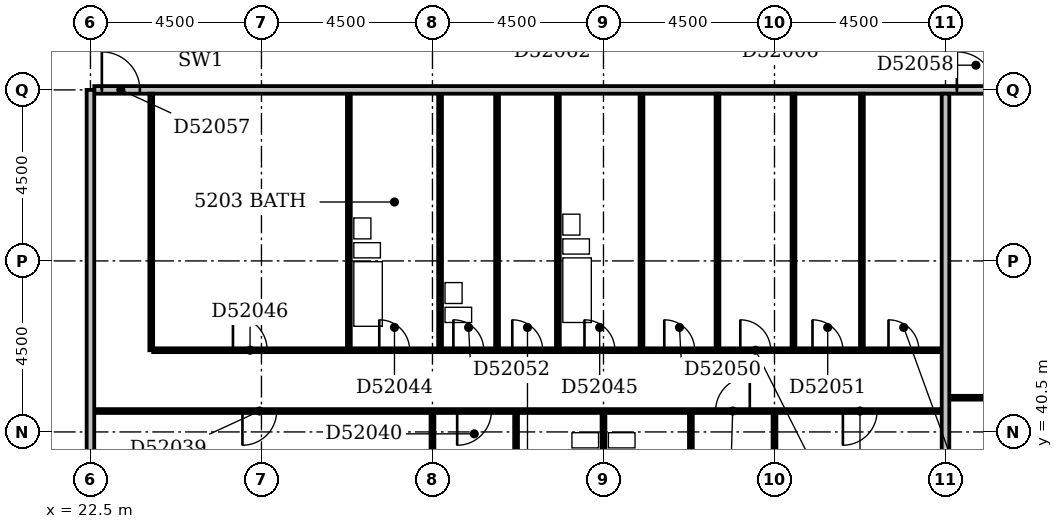
"""IFC4 building model, lengths in metres.
Left out: names, types, materials, properties, quantities, classifications, styles, units other than length and angle.
Written with IfcOpenShell. Run it as: python <this file> out.ifc"""

import sys

from ifc_helpers import new_model, si_unit, direction, frame, frame_2d, origin, place, context, subcontext, project, spatial, rectangle, extrude, element, fill, save


model = new_model("IFC4")
c1 = context("Model", 3, precision=1e-05, world=origin(), true_north=direction((0.0, 1.0)))
c2 = subcontext(c1, "Body", "Model", "MODEL_VIEW")
j1 = project(units=[si_unit("LENGTHUNIT", "METRE"), si_unit("PLANEANGLEUNIT", "RADIAN")], contexts=[c1])
p1 = place(None, origin())
s1 = spatial("IfcSite", under=j1, at=p1, CompositionType="ELEMENT")
p2 = place(p1, origin())
s2 = spatial("IfcBuilding", under=s1, at=p2, CompositionType="ELEMENT")
p3 = place(p2, frame((0.0, 0.0, 204.2)))
s3 = spatial("IfcBuildingStorey", under=s2, at=p3, CompositionType="ELEMENT", Elevation=204.2)
p4 = place(p3, frame((22.5, 36.45, 0.0), z_axis=(0.0, 0.0, 1.0), x_axis=(0.0, 1.0, 0.0)))
e1 = element("IfcWall", 1, at=p4, inside=s3, PredefinedType="PARTITIONING", context=c2, shape_type="SweptSolid", body=[
    extrude(rectangle(XDim=13.05, YDim=0.2, at=frame_2d((6.525, 0.0))), origin(), (0.0, 0.0, 1.0), 3.3),
])
p5 = place(p3, frame((31.5, 36.45, 0.0), z_axis=(0.0, 0.0, 1.0), x_axis=(0.0, 1.0, 0.0)))
e2 = element("IfcWall", 2, at=p5, inside=s3, PredefinedType="PARTITIONING", context=c2, shape_type="SweptSolid", body=[
    extrude(rectangle(XDim=4.55, YDim=0.1, at=frame_2d((2.275, 0.0))), origin(), (0.0, 0.0, 1.0), 3.3),
])
p6 = place(p3, frame((36.0, 36.45, 0.0), z_axis=(0.0, 0.0, 1.0), x_axis=(0.0, 1.0, 0.0)))
e3 = element("IfcWall", 3, at=p6, inside=s3, PredefinedType="PARTITIONING", context=c2, shape_type="SweptSolid", body=[
    extrude(rectangle(XDim=4.55, YDim=0.1, at=frame_2d((2.275, 0.0))), origin(), (0.0, 0.0, 1.0), 2.4),
])
p7 = place(p3, frame((40.5, 36.45, 0.0), z_axis=(0.0, 0.0, 1.0), x_axis=(0.0, 1.0, 0.0)))
e4 = element("IfcWall", 4, at=p7, inside=s3, PredefinedType="PARTITIONING", context=c2, shape_type="SweptSolid", body=[
    extrude(rectangle(XDim=4.55, YDim=0.1, at=frame_2d((2.275, 0.0))), origin(), (0.0, 0.0, 1.0), 3.3),
])
p8 = place(p3, frame((45.0, 36.45, 0.0), z_axis=(0.0, 0.0, 1.0), x_axis=(0.0, 1.0, 0.0)))
e5 = element("IfcWall", 5, at=p8, inside=s3, PredefinedType="PARTITIONING", context=c2, shape_type="SweptSolid", body=[
    extrude(rectangle(XDim=12.95, YDim=0.2, at=frame_2d((6.475, 0.0))), origin(), (0.0, 0.0, 1.0), 2.6),
])
p9 = place(p3, frame((33.7, 38.15, 0.0), z_axis=(0.0, 0.0, 1.0), x_axis=(0.0, 1.0, 0.0)))
e6 = element("IfcWall", 6, at=p9, inside=s3, PredefinedType="PLUMBINGWALL", context=c2, shape_type="SweptSolid", body=[
    extrude(rectangle(XDim=2.85, YDim=0.1, at=frame_2d((1.425, 0.0))), origin(), (0.0, 0.0, 1.0), 3.3),
])
p10 = place(p9, frame((1.05, 0.0, 0.0)))
e7 = element("IfcOpeningElement", 7, at=p10, cuts=e6, PredefinedType="OPENING", context=c2, shape_type="SweptSolid", body=[
    extrude(rectangle(XDim=0.8, YDim=2.1, at=frame_2d((0.4, 1.05))), frame((0.0, 0.062, 0.0), z_axis=(0.0, -1.0, 0.0), x_axis=(1.0, 0.0, 0.0)), (0.0, 0.0, 1.0), 0.124),
])
p11 = place(p3, frame((38.3, 38.15, 0.0), z_axis=(0.0, 0.0, 1.0), x_axis=(0.0, 1.0, 0.0)))
e8 = element("IfcWall", 8, at=p11, inside=s3, PredefinedType="PLUMBINGWALL", context=c2, shape_type="SweptSolid", body=[
    extrude(rectangle(XDim=2.85, YDim=0.1, at=frame_2d((1.425, 0.0))), origin(), (0.0, 0.0, 1.0), 3.3),
])
p12 = place(p11, frame((1.05, 0.0, 0.0)))
e9 = element("IfcOpeningElement", 9, at=p12, cuts=e8, PredefinedType="OPENING", context=c2, shape_type="SweptSolid", body=[
    extrude(rectangle(XDim=0.8, YDim=2.1, at=frame_2d((0.4, 1.05))), frame((0.0, 0.062, 0.0), z_axis=(0.0, -1.0, 0.0), x_axis=(1.0, 0.0, 0.0)), (0.0, 0.0, 1.0), 0.124),
])
p13 = place(p3, frame((22.6, 41.05, 0.0), z_axis=(0.0, 0.0, 1.0), x_axis=(1.0, 0.0, 0.0)))
e10 = element("IfcWall", 10, at=p13, inside=s3, PredefinedType="PARTITIONING", context=c2, shape_type="SweptSolid", body=[
    extrude(rectangle(XDim=22.3, YDim=0.1, at=frame_2d((11.15, 0.0))), origin(), (0.0, 0.0, 1.0), 3.3),
])
p14 = place(p13, frame((3.9, 0.0, 0.0)))
e11 = element("IfcOpeningElement", 11, at=p14, cuts=e10, PredefinedType="OPENING", context=c2, shape_type="SweptSolid", body=[
    extrude(rectangle(XDim=0.9, YDim=2.1, at=frame_2d((0.45, 1.05))), frame((0.0, 0.062, 0.0), z_axis=(0.0, -1.0, 0.0), x_axis=(1.0, 0.0, 0.0)), (0.0, 0.0, 1.0), 0.124),
])
p15 = place(p13, frame((9.55, 0.0, 0.0)))
e12 = element("IfcOpeningElement", 12, at=p15, cuts=e10, PredefinedType="OPENING", context=c2, shape_type="SweptSolid", body=[
    extrude(rectangle(XDim=0.9, YDim=2.1, at=frame_2d((0.45, 1.05))), frame((0.0, 0.062, 0.0), z_axis=(0.0, -1.0, 0.0), x_axis=(1.0, 0.0, 0.0)), (0.0, 0.0, 1.0), 0.124),
])
p16 = place(p13, frame((16.35, 0.0, 0.0)))
e13 = element("IfcOpeningElement", 13, at=p16, cuts=e10, PredefinedType="OPENING", context=c2, shape_type="SweptSolid", body=[
    extrude(rectangle(XDim=0.9, YDim=2.1, at=frame_2d((0.45, 1.05))), frame((0.0, 0.062, 0.0), z_axis=(0.0, -1.0, 0.0), x_axis=(1.0, 0.0, 0.0)), (0.0, 0.0, 1.0), 0.124),
])
p17 = place(p13, frame((19.7, 0.0, 0.0)))
e14 = element("IfcOpeningElement", 14, at=p17, cuts=e10, PredefinedType="OPENING", context=c2, shape_type="SweptSolid", body=[
    extrude(rectangle(XDim=0.9, YDim=2.1, at=frame_2d((0.45, 1.05))), frame((0.0, 0.062, 0.0), z_axis=(0.0, -1.0, 0.0), x_axis=(1.0, 0.0, 0.0)), (0.0, 0.0, 1.0), 0.124),
])
p18 = place(p3, frame((45.1, 41.4, 0.0), z_axis=(0.0, 0.0, 1.0), x_axis=(1.0, 0.0, 0.0)))
e15 = element("IfcWall", 15, at=p18, inside=s3, PredefinedType="PARTITIONING", context=c2, shape_type="SweptSolid", body=[
    extrude(rectangle(XDim=9.5, YDim=0.1, at=frame_2d((4.75, 0.0))), origin(), (0.0, 0.0, 1.0), 3.3),
])
p19 = place(p18, frame((3.95, 0.0, 0.0)))
e16 = element("IfcOpeningElement", 16, at=p19, cuts=e15, PredefinedType="OPENING", context=c2, shape_type="SweptSolid", body=[
    extrude(rectangle(XDim=0.9, YDim=2.1, at=frame_2d((0.45, 1.05))), frame((0.0, 0.062, 0.0), z_axis=(0.0, -1.0, 0.0), x_axis=(1.0, 0.0, 0.0)), (0.0, 0.0, 1.0), 0.124),
])
p20 = place(p3, frame((24.1, 42.65, 0.0), z_axis=(0.0, 0.0, 1.0), x_axis=(0.0, 1.0, 0.0)))
e17 = element("IfcWall", 17, at=p20, inside=s3, PredefinedType="PARTITIONING", context=c2, shape_type="SweptSolid", body=[
    extrude(rectangle(XDim=6.75, YDim=0.1, at=frame_2d((3.375, 0.0))), origin(), (0.0, 0.0, 1.0), 3.3),
])
p21 = place(p3, frame((24.15, 42.65, 0.0), z_axis=(0.0, 0.0, 1.0), x_axis=(1.0, 0.0, 0.0)))
e18 = element("IfcWall", 18, at=p21, inside=s3, PredefinedType="PARTITIONING", context=c2, shape_type="SweptSolid", body=[
    extrude(rectangle(XDim=20.75, YDim=0.1, at=frame_2d((10.375, 0.0))), origin(), (0.0, 0.0, 1.0), 3.3),
])
p22 = place(p21, frame((5.95, 0.0, 0.0)))
e19 = element("IfcOpeningElement", 19, at=p22, cuts=e18, PredefinedType="OPENING", context=c2, shape_type="SweptSolid", body=[
    extrude(rectangle(XDim=0.8, YDim=2.1, at=frame_2d((0.4, 1.05))), frame((0.0, 0.062, 0.0), z_axis=(0.0, -1.0, 0.0), x_axis=(1.0, 0.0, 0.0)), (0.0, 0.0, 1.0), 0.124),
])
p23 = place(p21, frame((11.35, 0.0, 0.0)))
e20 = element("IfcOpeningElement", 20, at=p23, cuts=e18, PredefinedType="OPENING", context=c2, shape_type="SweptSolid", body=[
    extrude(rectangle(XDim=0.8, YDim=2.1, at=frame_2d((0.4, 1.05))), frame((0.0, 0.062, 0.0), z_axis=(0.0, -1.0, 0.0), x_axis=(1.0, 0.0, 0.0)), (0.0, 0.0, 1.0), 0.124),
])
p24 = place(p21, frame((2.1, 0.0, 0.0)))
e21 = element("IfcOpeningElement", 21, at=p24, cuts=e18, PredefinedType="OPENING", context=c2, shape_type="SweptSolid", body=[
    extrude(rectangle(XDim=0.9, YDim=2.1, at=frame_2d((0.45, 1.05))), frame((0.0, 0.062, 0.0), z_axis=(0.0, -1.0, 0.0), x_axis=(1.0, 0.0, 0.0)), (0.0, 0.0, 1.0), 0.124),
])
p25 = place(p21, frame((19.35, 0.0, 0.0)))
e22 = element("IfcOpeningElement", 22, at=p25, cuts=e18, PredefinedType="OPENING", context=c2, shape_type="SweptSolid", body=[
    extrude(rectangle(XDim=0.8, YDim=2.1, at=frame_2d((0.4, 1.05))), frame((0.0, 0.062, 0.0), z_axis=(0.0, -1.0, 0.0), x_axis=(1.0, 0.0, 0.0)), (0.0, 0.0, 1.0), 0.124),
])
p26 = place(p21, frame((15.45, 0.0, 0.0)))
e23 = element("IfcOpeningElement", 23, at=p26, cuts=e18, PredefinedType="OPENING", context=c2, shape_type="SweptSolid", body=[
    extrude(rectangle(XDim=0.8, YDim=2.1, at=frame_2d((0.4, 1.05))), frame((0.0, 0.062, 0.0), z_axis=(0.0, -1.0, 0.0), x_axis=(1.0, 0.0, 0.0)), (0.0, 0.0, 1.0), 0.124),
])
p27 = place(p21, frame((9.45, 0.0, 0.0)))
e24 = element("IfcOpeningElement", 24, at=p27, cuts=e18, PredefinedType="OPENING", context=c2, shape_type="SweptSolid", body=[
    extrude(rectangle(XDim=0.8, YDim=2.1, at=frame_2d((0.4, 1.05))), frame((0.0, 0.062, 0.0), z_axis=(0.0, -1.0, 0.0), x_axis=(1.0, 0.0, 0.0)), (0.0, 0.0, 1.0), 0.124),
])
p28 = place(p21, frame((13.45, 0.0, 0.0)))
e25 = element("IfcOpeningElement", 25, at=p28, cuts=e18, PredefinedType="OPENING", context=c2, shape_type="SweptSolid", body=[
    extrude(rectangle(XDim=0.8, YDim=2.1, at=frame_2d((0.4, 1.05))), frame((0.0, 0.062, 0.0), z_axis=(0.0, -1.0, 0.0), x_axis=(1.0, 0.0, 0.0)), (0.0, 0.0, 1.0), 0.124),
])
p29 = place(p21, frame((17.35, 0.0, 0.0)))
e26 = element("IfcOpeningElement", 26, at=p29, cuts=e18, PredefinedType="OPENING", context=c2, shape_type="SweptSolid", body=[
    extrude(rectangle(XDim=0.8, YDim=2.1, at=frame_2d((0.4, 1.05))), frame((0.0, 0.062, 0.0), z_axis=(0.0, -1.0, 0.0), x_axis=(1.0, 0.0, 0.0)), (0.0, 0.0, 1.0), 0.124),
])
p30 = place(p21, frame((7.9, 0.0, 0.0)))
e27 = element("IfcOpeningElement", 27, at=p30, cuts=e18, PredefinedType="OPENING", context=c2, shape_type="SweptSolid", body=[
    extrude(rectangle(XDim=0.8, YDim=2.1, at=frame_2d((0.4, 1.05))), frame((0.0, 0.062, 0.0), z_axis=(0.0, -1.0, 0.0), x_axis=(1.0, 0.0, 0.0)), (0.0, 0.0, 1.0), 0.124),
])
for number, where, z_axis, x_axis in (
    (28, (29.3, 42.7, 0.0), (0.0, 0.0, 1.0), (0.0, 1.0, 0.0)),
    (29, (31.7, 42.7, 0.0), (0.0, 0.0, 1.0), (0.0, 1.0, 0.0)),
    (30, (33.2, 42.7, 0.0), (0.0, 0.0, 1.0), (0.0, 1.0, 0.0)),
    (31, (34.8, 42.7, 0.0), (0.0, 0.0, 1.0), (0.0, 1.0, 0.0)),
    (32, (37.0, 42.7, 0.0), (0.0, 0.0, 1.0), (0.0, 1.0, 0.0)),
):
    element("IfcWall", number, at=place(p3, frame(where, z_axis=z_axis, x_axis=x_axis)), inside=s3, PredefinedType="PLUMBINGWALL", context=c2, shape_type="SweptSolid", body=[
        extrude(rectangle(XDim=6.7, YDim=0.1, at=frame_2d((3.35, 0.0))), origin(), (0.0, 0.0, 1.0), 3.3),
    ])
for number, where, z_axis, x_axis in (
    (33, (39.0, 42.7, 0.0), (0.0, 0.0, 1.0), (0.0, 1.0, 0.0)),
    (34, (41.0, 42.7, 0.0), (0.0, 0.0, 1.0), (0.0, 1.0, 0.0)),
    (35, (42.8, 42.7, 0.0), (0.0, 0.0, 1.0), (0.0, 1.0, 0.0)),
):
    element("IfcWall", number, at=place(p3, frame(where, z_axis=z_axis, x_axis=x_axis)), inside=s3, PredefinedType="PARTITIONING", context=c2, shape_type="SweptSolid", body=[
        extrude(rectangle(XDim=6.7, YDim=0.1, at=frame_2d((3.35, 0.0))), origin(), (0.0, 0.0, 1.0), 3.3),
    ])
p31 = place(p3, frame((22.6, 49.5, 0.0), z_axis=(0.0, 0.0, 1.0), x_axis=(1.0, 0.0, 0.0)))
e36 = element("IfcWall", 36, at=p31, inside=s3, PredefinedType="PARTITIONING", context=c2, shape_type="SweptSolid", body=[
    extrude(rectangle(XDim=30.95, YDim=0.2, at=frame_2d((15.475, 0.0))), origin(), (0.0, 0.0, 1.0), 3.3),
])
p32 = place(p31, frame((0.2, 0.0, 0.0)))
e37 = element("IfcOpeningElement", 37, at=p32, cuts=e36, PredefinedType="OPENING", context=c2, shape_type="SweptSolid", body=[
    extrude(rectangle(XDim=1.0, YDim=2.1, at=frame_2d((0.5, 1.05))), frame((0.0, 0.112, 0.0), z_axis=(0.0, -1.0, 0.0), x_axis=(1.0, 0.0, 0.0)), (0.0, 0.0, 1.0), 0.224),
])
p33 = place(p31, frame((22.7, 0.0, 0.0)))
e38 = element("IfcOpeningElement", 38, at=p33, cuts=e36, PredefinedType="OPENING", context=c2, shape_type="SweptSolid", body=[
    extrude(rectangle(XDim=1.0, YDim=2.1, at=frame_2d((0.5, 1.05))), frame((0.0, 0.112, 0.0), z_axis=(0.0, -1.0, 0.0), x_axis=(1.0, 0.0, 0.0)), (0.0, 0.0, 1.0), 0.224),
])
p34 = place(p14, frame((0.9, 0.0, 0.0), z_axis=(0.0, 0.0, 1.0), x_axis=(-1.0, 0.0, 0.0)))
e39 = element("IfcDoor", 39, at=p34, inside=s3, OperationType="SINGLE_SWING_RIGHT", PredefinedType="DOOR", context=c2, shape_type="SweptSolid", body=[
    extrude(rectangle(XDim=0.9, YDim=2.1, at=frame_2d((0.45, 1.05))), frame((0.0, 0.025, 0.0), z_axis=(0.0, -1.0, 0.0), x_axis=(1.0, 0.0, 0.0)), (0.0, 0.0, 1.0), 0.05),
])
fill(e11, e39)
p35 = place(p15, frame((0.9, 0.0, 0.0), z_axis=(0.0, 0.0, 1.0), x_axis=(-1.0, 0.0, 0.0)))
e40 = element("IfcDoor", 40, at=p35, inside=s3, OperationType="SINGLE_SWING_RIGHT", PredefinedType="DOOR", context=c2, shape_type="SweptSolid", body=[
    extrude(rectangle(XDim=0.9, YDim=2.1, at=frame_2d((0.45, 1.05))), frame((0.0, 0.025, 0.0), z_axis=(0.0, -1.0, 0.0), x_axis=(1.0, 0.0, 0.0)), (0.0, 0.0, 1.0), 0.05),
])
fill(e12, e40)
p36 = place(p16, frame((0.9, 0.0, 0.0), z_axis=(0.0, 0.0, 1.0), x_axis=(-1.0, 0.0, 0.0)))
e41 = element("IfcDoor", 41, at=p36, inside=s3, OperationType="SINGLE_SWING_LEFT", PredefinedType="DOOR", context=c2, shape_type="SweptSolid", body=[
    extrude(rectangle(XDim=0.9, YDim=2.1, at=frame_2d((0.45, 1.05))), frame((0.0, 0.025, 0.0), z_axis=(0.0, -1.0, 0.0), x_axis=(1.0, 0.0, 0.0)), (0.0, 0.0, 1.0), 0.05),
])
fill(e13, e41)
p37 = place(p17, frame((0.9, 0.0, 0.0), z_axis=(0.0, 0.0, 1.0), x_axis=(-1.0, 0.0, 0.0)))
e42 = element("IfcDoor", 42, at=p37, inside=s3, OperationType="SINGLE_SWING_RIGHT", PredefinedType="DOOR", context=c2, shape_type="SweptSolid", body=[
    extrude(rectangle(XDim=0.9, YDim=2.1, at=frame_2d((0.45, 1.05))), frame((0.0, 0.025, 0.0), z_axis=(0.0, -1.0, 0.0), x_axis=(1.0, 0.0, 0.0)), (0.0, 0.0, 1.0), 0.05),
])
fill(e14, e42)
p38 = place(p22, origin())
e43 = element("IfcDoor", 43, at=p38, inside=s3, OperationType="SINGLE_SWING_LEFT", PredefinedType="DOOR", context=c2, shape_type="SweptSolid", body=[
    extrude(rectangle(XDim=0.8, YDim=2.1, at=frame_2d((0.4, 1.05))), frame((0.0, 0.025, 0.0), z_axis=(0.0, -1.0, 0.0), x_axis=(1.0, 0.0, 0.0)), (0.0, 0.0, 1.0), 0.05),
])
fill(e19, e43)
p39 = place(p23, origin())
e44 = element("IfcDoor", 44, at=p39, inside=s3, OperationType="SINGLE_SWING_LEFT", PredefinedType="DOOR", context=c2, shape_type="SweptSolid", body=[
    extrude(rectangle(XDim=0.8, YDim=2.1, at=frame_2d((0.4, 1.05))), frame((0.0, 0.025, 0.0), z_axis=(0.0, -1.0, 0.0), x_axis=(1.0, 0.0, 0.0)), (0.0, 0.0, 1.0), 0.05),
])
fill(e20, e44)
p40 = place(p24, origin())
e45 = element("IfcDoor", 45, at=p40, inside=s3, OperationType="SINGLE_SWING_LEFT", PredefinedType="DOOR", context=c2, shape_type="SweptSolid", body=[
    extrude(rectangle(XDim=0.9, YDim=2.1, at=frame_2d((0.45, 1.05))), frame((0.0, 0.025, 0.0), z_axis=(0.0, -1.0, 0.0), x_axis=(1.0, 0.0, 0.0)), (0.0, 0.0, 1.0), 0.05),
])
fill(e21, e45)
p41 = place(p25, origin())
e46 = element("IfcDoor", 46, at=p41, inside=s3, OperationType="SINGLE_SWING_LEFT", PredefinedType="DOOR", context=c2, shape_type="SweptSolid", body=[
    extrude(rectangle(XDim=0.8, YDim=2.1, at=frame_2d((0.4, 1.05))), frame((0.0, 0.025, 0.0), z_axis=(0.0, -1.0, 0.0), x_axis=(1.0, 0.0, 0.0)), (0.0, 0.0, 1.0), 0.05),
])
fill(e22, e46)
p42 = place(p26, origin())
e47 = element("IfcDoor", 47, at=p42, inside=s3, OperationType="SINGLE_SWING_LEFT", PredefinedType="DOOR", context=c2, shape_type="SweptSolid", body=[
    extrude(rectangle(XDim=0.8, YDim=2.1, at=frame_2d((0.4, 1.05))), frame((0.0, 0.025, 0.0), z_axis=(0.0, -1.0, 0.0), x_axis=(1.0, 0.0, 0.0)), (0.0, 0.0, 1.0), 0.05),
])
fill(e23, e47)
p43 = place(p27, origin())
e48 = element("IfcDoor", 48, at=p43, inside=s3, OperationType="SINGLE_SWING_LEFT", PredefinedType="DOOR", context=c2, shape_type="SweptSolid", body=[
    extrude(rectangle(XDim=0.8, YDim=2.1, at=frame_2d((0.4, 1.05))), frame((0.0, 0.025, 0.0), z_axis=(0.0, -1.0, 0.0), x_axis=(1.0, 0.0, 0.0)), (0.0, 0.0, 1.0), 0.05),
])
fill(e24, e48)
p44 = place(p28, origin())
e49 = element("IfcDoor", 49, at=p44, inside=s3, OperationType="SINGLE_SWING_LEFT", PredefinedType="DOOR", context=c2, shape_type="SweptSolid", body=[
    extrude(rectangle(XDim=0.8, YDim=2.1, at=frame_2d((0.4, 1.05))), frame((0.0, 0.025, 0.0), z_axis=(0.0, -1.0, 0.0), x_axis=(1.0, 0.0, 0.0)), (0.0, 0.0, 1.0), 0.05),
])
fill(e25, e49)
p45 = place(p29, origin())
e50 = element("IfcDoor", 50, at=p45, inside=s3, OperationType="SINGLE_SWING_LEFT", PredefinedType="DOOR", context=c2, shape_type="SweptSolid", body=[
    extrude(rectangle(XDim=0.8, YDim=2.1, at=frame_2d((0.4, 1.05))), frame((0.0, 0.025, 0.0), z_axis=(0.0, -1.0, 0.0), x_axis=(1.0, 0.0, 0.0)), (0.0, 0.0, 1.0), 0.05),
])
fill(e26, e50)
p46 = place(p30, origin())
e51 = element("IfcDoor", 51, at=p46, inside=s3, OperationType="SINGLE_SWING_LEFT", PredefinedType="DOOR", context=c2, shape_type="SweptSolid", body=[
    extrude(rectangle(XDim=0.8, YDim=2.1, at=frame_2d((0.4, 1.05))), frame((0.0, 0.025, 0.0), z_axis=(0.0, -1.0, 0.0), x_axis=(1.0, 0.0, 0.0)), (0.0, 0.0, 1.0), 0.05),
])
fill(e27, e51)
p47 = place(p32, origin())
e52 = element("IfcDoor", 52, at=p47, inside=s3, OperationType="SINGLE_SWING_LEFT", PredefinedType="DOOR", context=c2, shape_type="SweptSolid", body=[
    extrude(rectangle(XDim=1.0, YDim=2.1, at=frame_2d((0.5, 1.05))), frame((0.0, 0.025, 0.0), z_axis=(0.0, -1.0, 0.0), x_axis=(1.0, 0.0, 0.0)), (0.0, 0.0, 1.0), 0.05),
])
fill(e37, e52)
p48 = place(p33, origin())
e53 = element("IfcDoor", 53, at=p48, inside=s3, OperationType="SINGLE_SWING_LEFT", PredefinedType="DOOR", context=c2, shape_type="SweptSolid", body=[
    extrude(rectangle(XDim=1.0, YDim=2.1, at=frame_2d((0.5, 1.05))), frame((0.0, 0.025, 0.0), z_axis=(0.0, -1.0, 0.0), x_axis=(1.0, 0.0, 0.0)), (0.0, 0.0, 1.0), 0.05),
])
fill(e38, e53)
save(model, sys.argv[1])
